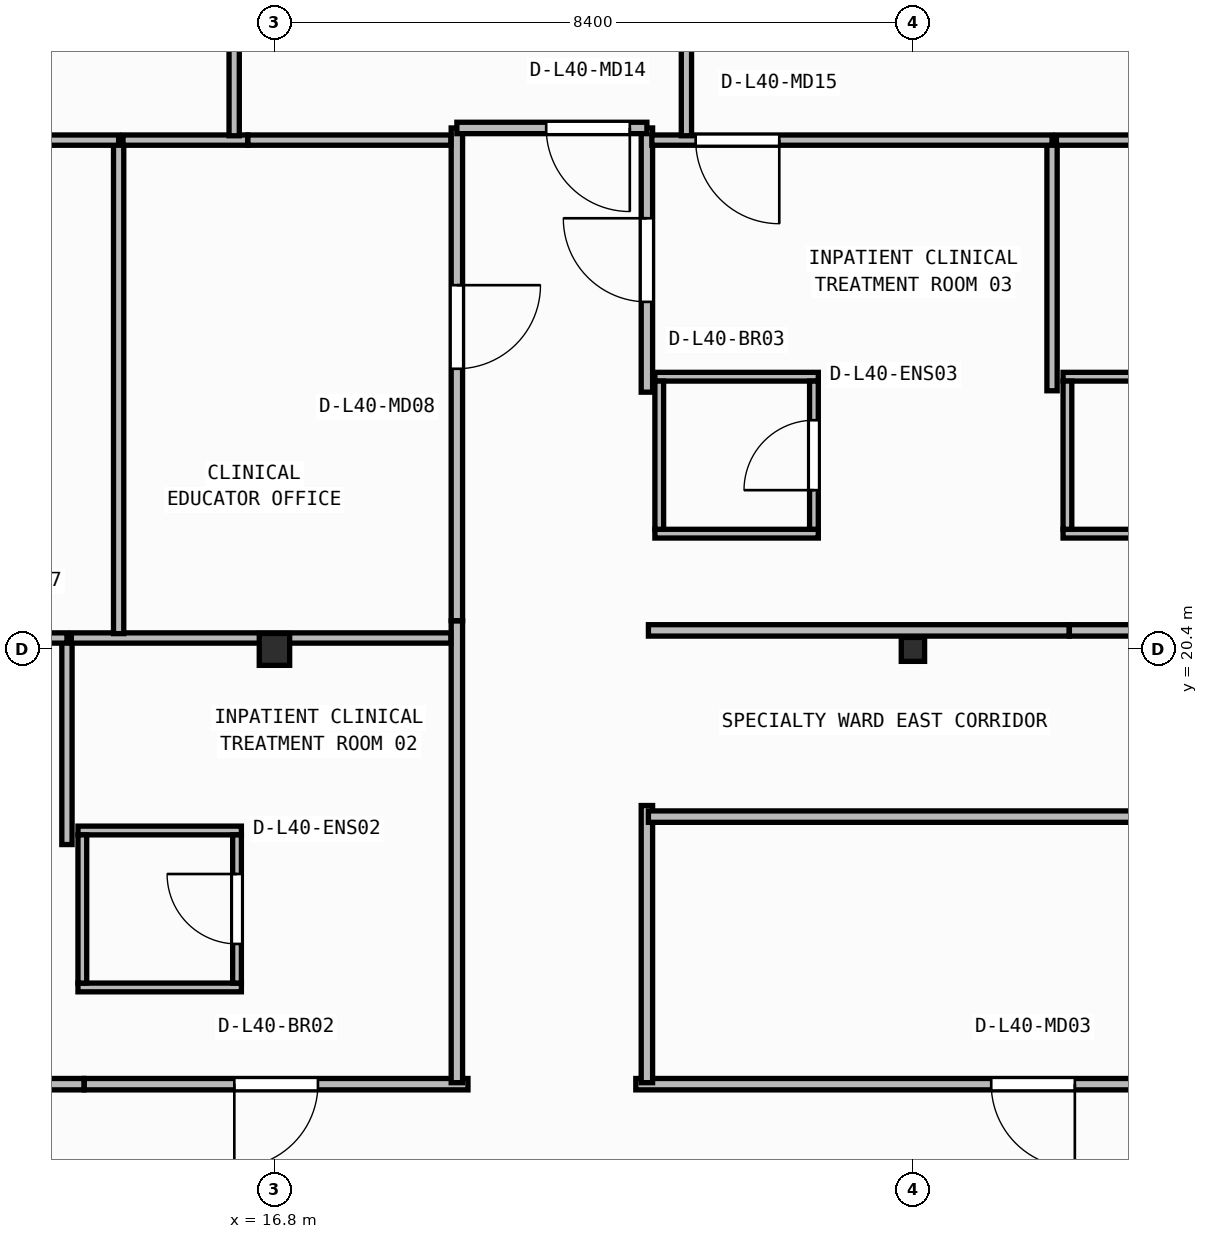
"""IFC4 building model, lengths in metres.
Left out: names, types, materials, properties, quantities, classifications, styles, units other than length and angle.
Written with IfcOpenShell. Run it as: python <this file> out.ifc"""

import sys

from ifc_helpers import new_model, si_unit, direction, frame, frame_2d, origin, origin_2d, place, context, subcontext, project, spatial, rectangle, i_section, extrude, element, fill, save


model = new_model("IFC4")
c1 = context("Model", 3, precision=1e-05, world=origin(), true_north=direction((0.0, 1.0)))
c2 = subcontext(c1, "Body", "Model", "MODEL_VIEW")
j1 = project(units=[si_unit("LENGTHUNIT", "METRE"), si_unit("PLANEANGLEUNIT", "RADIAN")], contexts=[c1])
p1 = place(None, origin())
s1 = spatial("IfcSite", under=j1, at=p1, CompositionType="ELEMENT")
p2 = place(p1, origin())
s2 = spatial("IfcBuilding", under=s1, at=p2, CompositionType="ELEMENT")
p3 = place(p2, frame((0.0, 0.0, 162.6)))
s3 = spatial("IfcBuildingStorey", under=s2, at=p3, CompositionType="ELEMENT", Elevation=162.6)
p4 = place(p3, frame((16.8, 20.4, 0.0), z_axis=(0.0, 0.0, 1.0), x_axis=(1.0, 0.0, 0.0)))
e1 = element("IfcColumn", 1, at=p4, inside=s3, PredefinedType="COLUMN", context=c2, shape_type="SweptSolid", body=[
    extrude(i_section(OverallWidth=0.4, OverallDepth=0.42, WebThickness=0.025, FlangeThickness=0.04, at=origin_2d()), origin(), (0.0, 0.0, 1.0), 3.95),
])
p5 = place(p3, frame((25.2, 20.4, 0.0), z_axis=(0.0, 0.0, 1.0), x_axis=(1.0, 0.0, 0.0)))
e2 = element("IfcColumn", 2, at=p5, inside=s3, PredefinedType="COLUMN", context=c2, shape_type="SweptSolid", body=[
    extrude(i_section(OverallWidth=0.307, OverallDepth=0.315, WebThickness=0.012, FlangeThickness=0.019, FilletRadius=0.017, at=origin_2d()), origin(), (0.0, 0.0, 1.0), 3.95),
])
for number, where, z_axis, x_axis in (
    (3, (14.215, 15.952, 0.0), (0.0, 0.0, 1.0), (1.0, 0.0, 0.0)),
    (4, (14.215, 18.018, 0.0), (0.0, 0.0, 1.0), (1.0, 0.0, 0.0)),
):
    element("IfcWall", number, at=place(p3, frame(where, z_axis=z_axis, x_axis=x_axis)), inside=s3, PredefinedType="PARTITIONING", context=c2, shape_type="SweptSolid", body=[
        extrude(rectangle(XDim=2.15, YDim=0.115, at=frame_2d((1.075, 0.0))), origin(), (0.0, 0.0, 1.0), 3.71),
    ])
p6 = place(p3, frame((14.272, 16.01, 0.0), z_axis=(0.0, 0.0, 1.0), x_axis=(0.0, 1.0, 0.0)))
e5 = element("IfcWall", 5, at=p6, inside=s3, PredefinedType="PARTITIONING", context=c2, shape_type="SweptSolid", body=[
    extrude(rectangle(XDim=1.95, YDim=0.115, at=frame_2d((0.975, 0.0))), origin(), (0.0, 0.0, 1.0), 3.71),
])
p7 = place(p3, frame((16.308, 16.01, 0.0), z_axis=(0.0, 0.0, 1.0), x_axis=(0.0, 1.0, 0.0)))
e6 = element("IfcWall", 6, at=p7, inside=s3, PredefinedType="PARTITIONING", context=c2, shape_type="SweptSolid", body=[
    extrude(rectangle(XDim=1.95, YDim=0.115, at=frame_2d((0.975, 0.0))), origin(), (0.0, 0.0, 1.0), 3.71),
])
p8 = place(p7, frame((0.515, 0.0, 0.0)))
e7 = element("IfcOpeningElement", 7, at=p8, cuts=e6, PredefinedType="OPENING", context=c2, shape_type="SweptSolid", body=[
    extrude(rectangle(XDim=0.92, YDim=2.1, at=frame_2d((0.46, 1.05))), frame((0.0, 0.067, 0.0), z_axis=(0.0, -1.0, 0.0), x_axis=(1.0, 0.0, 0.0)), (0.0, 0.0, 1.0), 0.135),
])
for number, where, z_axis, x_axis in (
    (8, (21.805, 21.923, 0.0), (0.0, 0.0, 1.0), (1.0, 0.0, 0.0)),
    (9, (21.805, 23.988, 0.0), (0.0, 0.0, 1.0), (1.0, 0.0, 0.0)),
):
    element("IfcWall", number, at=place(p3, frame(where, z_axis=z_axis, x_axis=x_axis)), inside=s3, PredefinedType="PARTITIONING", context=c2, shape_type="SweptSolid", body=[
        extrude(rectangle(XDim=2.15, YDim=0.115, at=frame_2d((1.075, 0.0))), origin(), (0.0, 0.0, 1.0), 3.71),
    ])
p9 = place(p3, frame((21.863, 21.98, 0.0), z_axis=(0.0, 0.0, 1.0), x_axis=(0.0, 1.0, 0.0)))
e10 = element("IfcWall", 10, at=p9, inside=s3, PredefinedType="PARTITIONING", context=c2, shape_type="SweptSolid", body=[
    extrude(rectangle(XDim=1.95, YDim=0.115, at=frame_2d((0.975, 0.0))), origin(), (0.0, 0.0, 1.0), 3.71),
])
p10 = place(p3, frame((23.897, 21.98, 0.0), z_axis=(0.0, 0.0, 1.0), x_axis=(0.0, 1.0, 0.0)))
e11 = element("IfcWall", 11, at=p10, inside=s3, PredefinedType="PARTITIONING", context=c2, shape_type="SweptSolid", body=[
    extrude(rectangle(XDim=1.95, YDim=0.115, at=frame_2d((0.975, 0.0))), origin(), (0.0, 0.0, 1.0), 3.71),
])
p11 = place(p10, frame((0.515, 0.0, 0.0)))
e12 = element("IfcOpeningElement", 12, at=p11, cuts=e11, PredefinedType="OPENING", context=c2, shape_type="SweptSolid", body=[
    extrude(rectangle(XDim=0.92, YDim=2.1, at=frame_2d((0.46, 1.05))), frame((0.0, 0.067, 0.0), z_axis=(0.0, -1.0, 0.0), x_axis=(1.0, 0.0, 0.0)), (0.0, 0.0, 1.0), 0.135),
])
for number, where, z_axis, x_axis in (
    (13, (27.175, 21.923, 0.0), (0.0, 0.0, 1.0), (1.0, 0.0, 0.0)),
    (14, (27.175, 23.988, 0.0), (0.0, 0.0, 1.0), (1.0, 0.0, 0.0)),
):
    element("IfcWall", number, at=place(p3, frame(where, z_axis=z_axis, x_axis=x_axis)), inside=s3, PredefinedType="PARTITIONING", context=c2, shape_type="SweptSolid", body=[
        extrude(rectangle(XDim=2.15, YDim=0.115, at=frame_2d((1.075, 0.0))), origin(), (0.0, 0.0, 1.0), 3.71),
    ])
p12 = place(p3, frame((27.232, 21.98, 0.0), z_axis=(0.0, 0.0, 1.0), x_axis=(0.0, 1.0, 0.0)))
e15 = element("IfcWall", 15, at=p12, inside=s3, PredefinedType="PARTITIONING", context=c2, shape_type="SweptSolid", body=[
    extrude(rectangle(XDim=1.95, YDim=0.115, at=frame_2d((0.975, 0.0))), origin(), (0.0, 0.0, 1.0), 3.71),
])
p13 = place(p3, frame((14.296, 14.68, 0.0), z_axis=(0.0, 0.0, 1.0), x_axis=(-1.0, 0.0, 0.0)))
e16 = element("IfcWall", 16, at=p13, inside=s3, PredefinedType="PARTITIONING", context=c2, shape_type="SweptSolid", body=[
    extrude(rectangle(XDim=4.628, YDim=0.15, at=frame_2d((2.314, 0.0))), origin(), (0.0, 0.0, 1.0), 3.71),
])
p14 = place(p13, frame((1.764, 0.0, 0.0)))
e17 = element("IfcOpeningElement", 17, at=p14, cuts=e16, PredefinedType="OPENING", context=c2, shape_type="SweptSolid", body=[
    extrude(rectangle(XDim=1.1, YDim=2.1, at=frame_2d((0.55, 1.05))), frame((0.0, 0.085, 0.0), z_axis=(0.0, -1.0, 0.0), x_axis=(1.0, 0.0, 0.0)), (0.0, 0.0, 1.0), 0.17),
])
p15 = place(p3, frame((19.346, 14.68, 0.0), z_axis=(0.0, 0.0, 1.0), x_axis=(-1.0, 0.0, 0.0)))
e18 = element("IfcWall", 18, at=p15, inside=s3, PredefinedType="PARTITIONING", context=c2, shape_type="SweptSolid", body=[
    extrude(rectangle(XDim=5.048, YDim=0.15, at=frame_2d((2.524, 0.0))), origin(), (0.0, 0.0, 1.0), 3.71),
])
p16 = place(p15, frame((1.974, 0.0, 0.0)))
e19 = element("IfcOpeningElement", 19, at=p16, cuts=e18, PredefinedType="OPENING", context=c2, shape_type="SweptSolid", body=[
    extrude(rectangle(XDim=1.1, YDim=2.1, at=frame_2d((0.55, 1.05))), frame((0.0, 0.085, 0.0), z_axis=(0.0, -1.0, 0.0), x_axis=(1.0, 0.0, 0.0)), (0.0, 0.0, 1.0), 0.17),
])
p17 = place(p3, frame((32.006, 14.68, 0.0), z_axis=(0.0, 0.0, 1.0), x_axis=(-1.0, 0.0, 0.0)))
e20 = element("IfcWall", 20, at=p17, inside=s3, PredefinedType="PARTITIONING", context=c2, shape_type="SweptSolid", body=[
    extrude(rectangle(XDim=10.452, YDim=0.15, at=frame_2d((5.226, 0.0))), origin(), (0.0, 0.0, 1.0), 3.71),
])
p18 = place(p17, frame((4.676, 0.0, 0.0)))
e21 = element("IfcOpeningElement", 21, at=p18, cuts=e20, PredefinedType="OPENING", context=c2, shape_type="SweptSolid", body=[
    extrude(rectangle(XDim=1.1, YDim=2.1, at=frame_2d((0.55, 1.05))), frame((0.0, 0.085, 0.0), z_axis=(0.0, -1.0, 0.0), x_axis=(1.0, 0.0, 0.0)), (0.0, 0.0, 1.0), 0.17),
])
p19 = place(p3, frame((19.2, 20.776, 0.0), z_axis=(0.0, 0.0, 1.0), x_axis=(0.0, -1.0, 0.0)))
e22 = element("IfcWall", 22, at=p19, inside=s3, PredefinedType="PARTITIONING", context=c2, shape_type="SweptSolid", body=[
    extrude(rectangle(XDim=6.076, YDim=0.15, at=frame_2d((3.038, 0.0))), origin(), (0.0, 0.0, 1.0), 3.71),
])
p20 = place(p3, frame((21.7, 14.7, 0.0), z_axis=(0.0, 0.0, 1.0), x_axis=(0.0, 1.0, 0.0)))
e23 = element("IfcWall", 23, at=p20, inside=s3, PredefinedType="PARTITIONING", context=c2, shape_type="SweptSolid", body=[
    extrude(rectangle(XDim=3.646, YDim=0.15, at=frame_2d((1.823, 0.0))), origin(), (0.0, 0.0, 1.0), 3.71),
])
p21 = place(p3, frame((19.2, 27.26, 0.0), z_axis=(0.0, 0.0, 1.0), x_axis=(0.0, -1.0, 0.0)))
e24 = element("IfcWall", 24, at=p21, inside=s3, PredefinedType="PARTITIONING", context=c2, shape_type="SweptSolid", body=[
    extrude(rectangle(XDim=6.482, YDim=0.15, at=frame_2d((3.241, 0.0))), origin(), (0.0, 0.0, 1.0), 3.71),
])
p22 = place(p21, frame((2.068, 0.0, 0.0)))
e25 = element("IfcOpeningElement", 25, at=p22, cuts=e24, PredefinedType="OPENING", context=c2, shape_type="SweptSolid", body=[
    extrude(rectangle(XDim=1.1, YDim=2.1, at=frame_2d((0.55, 1.05))), frame((0.0, 0.085, 0.0), z_axis=(0.0, -1.0, 0.0), x_axis=(1.0, 0.0, 0.0)), (0.0, 0.0, 1.0), 0.17),
])
p23 = place(p3, frame((21.7, 23.784, 0.0), z_axis=(0.0, 0.0, 1.0), x_axis=(0.0, 1.0, 0.0)))
e26 = element("IfcWall", 26, at=p23, inside=s3, PredefinedType="PARTITIONING", context=c2, shape_type="SweptSolid", body=[
    extrude(rectangle(XDim=3.476, YDim=0.15, at=frame_2d((1.738, 0.0))), origin(), (0.0, 0.0, 1.0), 3.71),
])
p24 = place(p23, frame((1.188, 0.0, 0.0)))
e27 = element("IfcOpeningElement", 27, at=p24, cuts=e26, PredefinedType="OPENING", context=c2, shape_type="SweptSolid", body=[
    extrude(rectangle(XDim=1.1, YDim=2.1, at=frame_2d((0.55, 1.05))), frame((0.0, 0.085, 0.0), z_axis=(0.0, -1.0, 0.0), x_axis=(1.0, 0.0, 0.0)), (0.0, 0.0, 1.0), 0.17),
])
p25 = place(p3, frame((21.7, 27.26, 0.0), z_axis=(0.0, 0.0, 1.0), x_axis=(-1.0, 0.0, 0.0)))
e28 = element("IfcWall", 28, at=p25, inside=s3, PredefinedType="PARTITIONING", context=c2, shape_type="SweptSolid", body=[
    extrude(rectangle(XDim=2.5, YDim=0.15, at=frame_2d((1.25, 0.0))), origin(), (0.0, 0.0, 1.0), 3.71),
])
p26 = place(p25, frame((0.225, 0.0, 0.0)))
e29 = element("IfcOpeningElement", 29, at=p26, cuts=e28, PredefinedType="OPENING", context=c2, shape_type="SweptSolid", body=[
    extrude(rectangle(XDim=1.1, YDim=2.1, at=frame_2d((0.55, 1.05))), frame((0.0, 0.085, 0.0), z_axis=(0.0, -1.0, 0.0), x_axis=(1.0, 0.0, 0.0)), (0.0, 0.0, 1.0), 0.17),
])
p27 = place(p3, frame((21.72, 18.2, 0.0), z_axis=(0.0, 0.0, 1.0), x_axis=(1.0, 0.0, 0.0)))
e30 = element("IfcWall", 30, at=p27, inside=s3, PredefinedType="PARTITIONING", context=c2, shape_type="SweptSolid", body=[
    extrude(rectangle(XDim=10.286, YDim=0.15, at=frame_2d((5.143, 0.0))), origin(), (0.0, 0.0, 1.0), 3.71),
])
p28 = place(p3, frame((27.256, 20.65, 0.0), z_axis=(0.0, 0.0, 1.0), x_axis=(-1.0, 0.0, 0.0)))
e31 = element("IfcWall", 31, at=p28, inside=s3, PredefinedType="PARTITIONING", context=c2, shape_type="SweptSolid", body=[
    extrude(rectangle(XDim=5.536, YDim=0.15, at=frame_2d((2.768, 0.0))), origin(), (0.0, 0.0, 1.0), 3.083),
])
p29 = place(p3, frame((31.776, 20.65, 0.0), z_axis=(0.0, 0.0, 1.0), x_axis=(-1.0, 0.0, 0.0)))
e32 = element("IfcWall", 32, at=p29, inside=s3, PredefinedType="PARTITIONING", context=c2, shape_type="SweptSolid", body=[
    extrude(rectangle(XDim=4.518, YDim=0.15, at=frame_2d((2.259, 0.0))), origin(), (0.0, 0.0, 1.0), 3.083),
])
p30 = place(p29, frame((1.86, 0.0, 0.0)))
e33 = element("IfcOpeningElement", 33, at=p30, cuts=e32, PredefinedType="OPENING", context=c2, shape_type="SweptSolid", body=[
    extrude(rectangle(XDim=1.1, YDim=2.1, at=frame_2d((0.55, 1.05))), frame((0.0, 0.085, 0.0), z_axis=(0.0, -1.0, 0.0), x_axis=(1.0, 0.0, 0.0)), (0.0, 0.0, 1.0), 0.17),
])
p31 = place(p3, frame((14.07, 17.833, 0.0), z_axis=(0.0, 0.0, 1.0), x_axis=(0.0, 1.0, 0.0)))
e34 = element("IfcWall", 34, at=p31, inside=s3, PredefinedType="PARTITIONING", context=c2, shape_type="SweptSolid", body=[
    extrude(rectangle(XDim=2.718, YDim=0.135, at=frame_2d((1.359, 0.0))), origin(), (0.0, 0.0, 1.0), 3.71),
])
p32 = place(p3, frame((14.07, 20.55, 0.0), z_axis=(0.0, 0.0, 1.0), x_axis=(-1.0, 0.0, 0.0)))
e35 = element("IfcWall", 35, at=p32, inside=s3, PredefinedType="PARTITIONING", context=c2, shape_type="SweptSolid", body=[
    extrude(rectangle(XDim=4.573, YDim=0.135, at=frame_2d((2.286, 0.0))), origin(), (0.0, 0.0, 1.0), 3.083),
])
p33 = place(p32, frame((0.277, 0.0, 0.0)))
e36 = element("IfcOpeningElement", 36, at=p33, cuts=e35, PredefinedType="OPENING", context=c2, shape_type="SweptSolid", body=[
    extrude(rectangle(XDim=1.1, YDim=2.1, at=frame_2d((0.55, 1.05))), frame((0.0, 0.077, 0.0), z_axis=(0.0, -1.0, 0.0), x_axis=(1.0, 0.0, 0.0)), (0.0, 0.0, 1.0), 0.155),
])
p34 = place(p3, frame((19.12, 20.55, 0.0), z_axis=(0.0, 0.0, 1.0), x_axis=(-1.0, 0.0, 0.0)))
e37 = element("IfcWall", 37, at=p34, inside=s3, PredefinedType="PARTITIONING", context=c2, shape_type="SweptSolid", body=[
    extrude(rectangle(XDim=4.993, YDim=0.135, at=frame_2d((2.496, 0.0))), origin(), (0.0, 0.0, 1.0), 3.083),
])
p35 = place(p3, frame((14.75, 20.607, 0.0), z_axis=(0.0, 0.0, 1.0), x_axis=(0.0, 1.0, 0.0)))
e38 = element("IfcWall", 38, at=p35, inside=s3, PredefinedType="PARTITIONING", context=c2, shape_type="SweptSolid", body=[
    extrude(rectangle(XDim=6.493, YDim=0.135, at=frame_2d((3.246, 0.0))), origin(), (0.0, 0.0, 1.0), 3.71),
])
p36 = place(p3, frame((14.75, 27.1, 0.0), z_axis=(0.0, 0.0, 1.0), x_axis=(-1.0, 0.0, 0.0)))
e39 = element("IfcWall", 39, at=p36, inside=s3, PredefinedType="PARTITIONING", context=c2, shape_type="SweptSolid", body=[
    extrude(rectangle(XDim=7.923, YDim=0.135, at=frame_2d((3.961, 0.0))), origin(), (0.0, 0.0, 1.0), 3.71),
])
p37 = place(p3, frame((16.448, 27.1, 0.0), z_axis=(0.0, 0.0, 1.0), x_axis=(-1.0, 0.0, 0.0)))
e40 = element("IfcWall", 40, at=p37, inside=s3, PredefinedType="PARTITIONING", context=c2, shape_type="SweptSolid", body=[
    extrude(rectangle(XDim=1.641, YDim=0.135, at=frame_2d((0.82, 0.0))), origin(), (0.0, 0.0, 1.0), 3.71),
])
p38 = place(p3, frame((19.12, 27.1, 0.0), z_axis=(0.0, 0.0, 1.0), x_axis=(-1.0, 0.0, 0.0)))
e41 = element("IfcWall", 41, at=p38, inside=s3, PredefinedType="PARTITIONING", context=c2, shape_type="SweptSolid", body=[
    extrude(rectangle(XDim=2.67, YDim=0.135, at=frame_2d((1.335, 0.0))), origin(), (0.0, 0.0, 1.0), 3.71),
])
p39 = place(p3, frame((27.03, 23.802, 0.0), z_axis=(0.0, 0.0, 1.0), x_axis=(0.0, 1.0, 0.0)))
e42 = element("IfcWall", 42, at=p39, inside=s3, PredefinedType="PARTITIONING", context=c2, shape_type="SweptSolid", body=[
    extrude(rectangle(XDim=3.298, YDim=0.135, at=frame_2d((1.649, 0.0))), origin(), (0.0, 0.0, 1.0), 3.71),
])
p40 = place(p3, frame((27.03, 27.1, 0.0), z_axis=(0.0, 0.0, 1.0), x_axis=(-1.0, 0.0, 0.0)))
e43 = element("IfcWall", 43, at=p40, inside=s3, PredefinedType="PARTITIONING", context=c2, shape_type="SweptSolid", body=[
    extrude(rectangle(XDim=5.265, YDim=0.135, at=frame_2d((2.633, 0.0))), origin(), (0.0, 0.0, 1.0), 3.71),
])
p41 = place(p40, frame((3.588, 0.0, 0.0)))
e44 = element("IfcOpeningElement", 44, at=p41, cuts=e43, PredefinedType="OPENING", context=c2, shape_type="SweptSolid", body=[
    extrude(rectangle(XDim=1.1, YDim=2.1, at=frame_2d((0.55, 1.05))), frame((0.0, 0.077, 0.0), z_axis=(0.0, -1.0, 0.0), x_axis=(1.0, 0.0, 0.0)), (0.0, 0.0, 1.0), 0.155),
])
p42 = place(p3, frame((31.499, 27.1, 0.0), z_axis=(0.0, 0.0, 1.0), x_axis=(-1.0, 0.0, 0.0)))
e45 = element("IfcWall", 45, at=p42, inside=s3, PredefinedType="PARTITIONING", context=c2, shape_type="SweptSolid", body=[
    extrude(rectangle(XDim=4.411, YDim=0.135, at=frame_2d((2.206, 0.0))), origin(), (0.0, 0.0, 1.0), 3.71),
])
p43 = place(p3, frame((16.27, 27.157, 0.0), z_axis=(0.0, 0.0, 1.0), x_axis=(0.0, 1.0, 0.0)))
e46 = element("IfcWall", 46, at=p43, inside=s3, PredefinedType="PARTITIONING", context=c2, shape_type="SweptSolid", body=[
    extrude(rectangle(XDim=8.014, YDim=0.135, at=frame_2d((4.007, 0.0))), origin(), (0.0, 0.0, 1.0), 3.71),
])
p44 = place(p3, frame((22.22, 27.157, 0.0), z_axis=(0.0, 0.0, 1.0), x_axis=(0.0, 1.0, 0.0)))
e47 = element("IfcWall", 47, at=p44, inside=s3, PredefinedType="PARTITIONING", context=c2, shape_type="SweptSolid", body=[
    extrude(rectangle(XDim=5.29, YDim=0.135, at=frame_2d((2.645, 0.0))), origin(), (0.0, 0.0, 1.0), 3.71),
])
p45 = place(p8, origin())
e48 = element("IfcDoor", 48, at=p45, inside=s3, OperationType="SINGLE_SWING_RIGHT", PredefinedType="DOOR", context=c2, shape_type="SweptSolid", body=[
    extrude(rectangle(XDim=0.92, YDim=2.1, at=frame_2d((0.46, 1.05))), frame((0.0, 0.025, 0.0), z_axis=(0.0, -1.0, 0.0), x_axis=(1.0, 0.0, 0.0)), (0.0, 0.0, 1.0), 0.05),
])
fill(e7, e48)
p46 = place(p11, origin())
e49 = element("IfcDoor", 49, at=p46, inside=s3, OperationType="SINGLE_SWING_LEFT", PredefinedType="DOOR", context=c2, shape_type="SweptSolid", body=[
    extrude(rectangle(XDim=0.92, YDim=2.1, at=frame_2d((0.46, 1.05))), frame((0.0, 0.025, 0.0), z_axis=(0.0, -1.0, 0.0), x_axis=(1.0, 0.0, 0.0)), (0.0, 0.0, 1.0), 0.05),
])
fill(e12, e49)
p47 = place(p16, origin())
e50 = element("IfcDoor", 50, at=p47, inside=s3, OperationType="SINGLE_SWING_RIGHT", PredefinedType="DOOR", context=c2, shape_type="SweptSolid", body=[
    extrude(rectangle(XDim=1.1, YDim=2.1, at=frame_2d((0.55, 1.05))), frame((0.0, 0.025, 0.0), z_axis=(0.0, -1.0, 0.0), x_axis=(1.0, 0.0, 0.0)), (0.0, 0.0, 1.0), 0.05),
])
fill(e19, e50)
p48 = place(p18, origin())
e51 = element("IfcDoor", 51, at=p48, inside=s3, OperationType="SINGLE_SWING_LEFT", PredefinedType="DOOR", context=c2, shape_type="SweptSolid", body=[
    extrude(rectangle(XDim=1.1, YDim=2.1, at=frame_2d((0.55, 1.05))), frame((0.0, 0.025, 0.0), z_axis=(0.0, -1.0, 0.0), x_axis=(1.0, 0.0, 0.0)), (0.0, 0.0, 1.0), 0.05),
])
fill(e21, e51)
p49 = place(p22, origin())
e52 = element("IfcDoor", 52, at=p49, inside=s3, OperationType="SINGLE_SWING_LEFT", PredefinedType="DOOR", context=c2, shape_type="SweptSolid", body=[
    extrude(rectangle(XDim=1.1, YDim=2.1, at=frame_2d((0.55, 1.05))), frame((0.0, 0.025, 0.0), z_axis=(0.0, -1.0, 0.0), x_axis=(1.0, 0.0, 0.0)), (0.0, 0.0, 1.0), 0.05),
])
fill(e25, e52)
p50 = place(p24, origin())
e53 = element("IfcDoor", 53, at=p50, inside=s3, OperationType="SINGLE_SWING_RIGHT", PredefinedType="DOOR", context=c2, shape_type="SweptSolid", body=[
    extrude(rectangle(XDim=1.1, YDim=2.1, at=frame_2d((0.55, 1.05))), frame((0.0, 0.025, 0.0), z_axis=(0.0, -1.0, 0.0), x_axis=(1.0, 0.0, 0.0)), (0.0, 0.0, 1.0), 0.05),
])
fill(e27, e53)
p51 = place(p26, origin())
e54 = element("IfcDoor", 54, at=p51, inside=s3, OperationType="SINGLE_SWING_LEFT", PredefinedType="DOOR", context=c2, shape_type="SweptSolid", body=[
    extrude(rectangle(XDim=1.1, YDim=2.1, at=frame_2d((0.55, 1.05))), frame((0.0, 0.025, 0.0), z_axis=(0.0, -1.0, 0.0), x_axis=(1.0, 0.0, 0.0)), (0.0, 0.0, 1.0), 0.05),
])
fill(e29, e54)
p52 = place(p41, origin())
e55 = element("IfcDoor", 55, at=p52, inside=s3, OperationType="SINGLE_SWING_LEFT", PredefinedType="DOOR", context=c2, shape_type="SweptSolid", body=[
    extrude(rectangle(XDim=1.1, YDim=2.1, at=frame_2d((0.55, 1.05))), frame((0.0, 0.025, 0.0), z_axis=(0.0, -1.0, 0.0), x_axis=(1.0, 0.0, 0.0)), (0.0, 0.0, 1.0), 0.05),
])
fill(e44, e55)
save(model, sys.argv[1])
